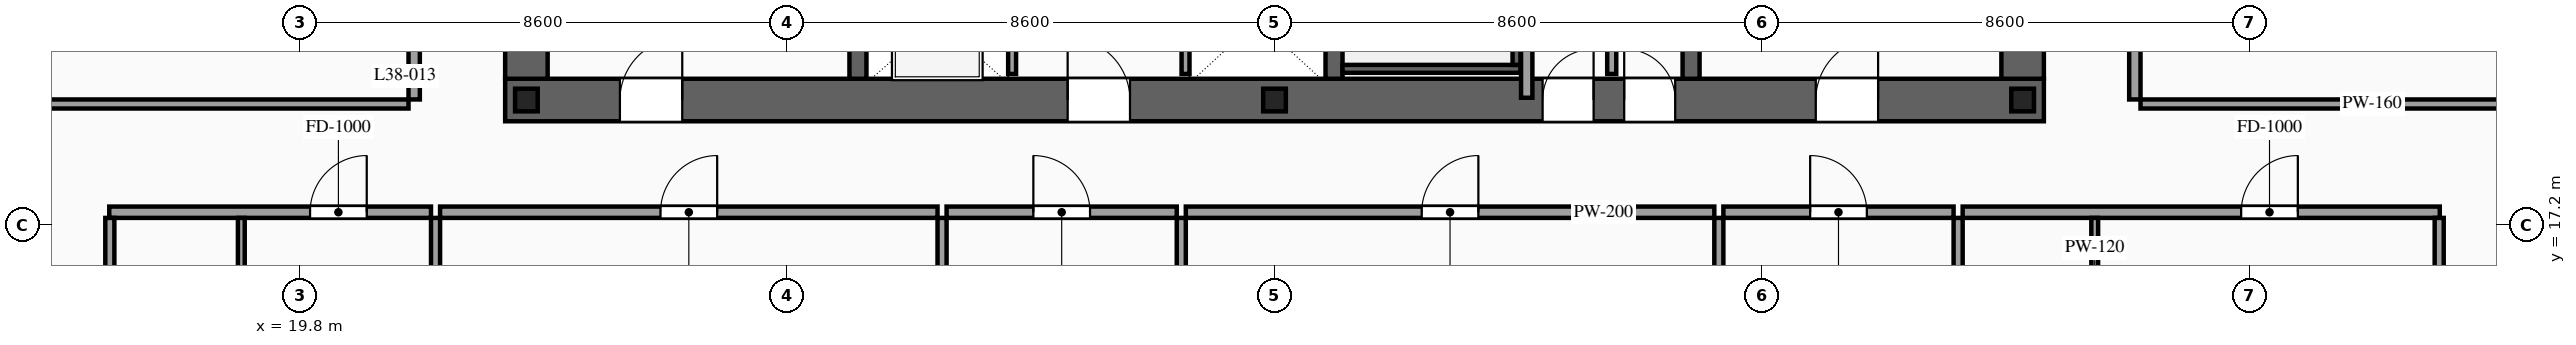
"""IFC4 building model, lengths in metres.
Left out: names, types, materials, properties, quantities, classifications, styles, units other than length and angle.
Written with IfcOpenShell. Run it as: python <this file> out.ifc"""

import sys

from ifc_helpers import new_model, si_unit, direction, frame, frame_2d, origin, origin_2d, place, context, subcontext, project, spatial, rectangle, i_section, extrude, source, transform, mapped, element, fill, save


model = new_model("IFC4")
c1 = context("Model", 3, precision=1e-05, world=origin(), true_north=direction((0.0, 1.0)))
c2 = subcontext(c1, "Body", "Model", "MODEL_VIEW")
j1 = project(units=[si_unit("LENGTHUNIT", "METRE"), si_unit("PLANEANGLEUNIT", "RADIAN")], contexts=[c1])
p1 = place(None, origin())
s1 = spatial("IfcSite", under=j1, at=p1, CompositionType="ELEMENT")
p2 = place(p1, origin())
s2 = spatial("IfcBuilding", under=s1, at=p2, CompositionType="ELEMENT")
p3 = place(p2, frame((0.0, 0.0, 145.2)))
s3 = spatial("IfcBuildingStorey", under=s2, at=p3, CompositionType="ELEMENT", Elevation=145.2)
p4 = place(p3, frame((23.425, 19.4, 0.0), z_axis=(0.0, 0.0, 1.0), x_axis=(1.0, 0.0, 0.0)))
e1 = element("IfcWall", 1, at=p4, inside=s3, PredefinedType="SHEAR", context=c2, shape_type="SweptSolid", body=[
    extrude(rectangle(XDim=27.15, YDim=0.75, at=frame_2d((13.575, 0.0))), origin(), (0.0, 0.0, 1.0), 3.6),
])
p5 = place(p4, frame((2.025, 0.0, 0.0)))
e2 = element("IfcOpeningElement", 2, at=p5, cuts=e1, PredefinedType="OPENING", context=c2, shape_type="SweptSolid", body=[
    extrude(rectangle(XDim=1.1, YDim=2.2, at=frame_2d((0.55, 1.1))), frame((0.0, 0.39, 0.0), z_axis=(0.0, -1.0, 0.0), x_axis=(1.0, 0.0, 0.0)), (0.0, 0.0, 1.0), 0.78),
])
p6 = place(p4, frame((9.925, 0.0, 0.0)))
e3 = element("IfcOpeningElement", 3, at=p6, cuts=e1, PredefinedType="OPENING", context=c2, shape_type="SweptSolid", body=[
    extrude(rectangle(XDim=1.1, YDim=2.2, at=frame_2d((0.55, 1.1))), frame((0.0, 0.39, 0.0), z_axis=(0.0, -1.0, 0.0), x_axis=(1.0, 0.0, 0.0)), (0.0, 0.0, 1.0), 0.78),
])
p7 = place(p4, frame((23.125, 0.0, 0.0)))
e4 = element("IfcOpeningElement", 4, at=p7, cuts=e1, PredefinedType="OPENING", context=c2, shape_type="SweptSolid", body=[
    extrude(rectangle(XDim=1.1, YDim=2.2, at=frame_2d((0.55, 1.1))), frame((0.0, 0.39, 0.0), z_axis=(0.0, -1.0, 0.0), x_axis=(1.0, 0.0, 0.0)), (0.0, 0.0, 1.0), 0.78),
])
p8 = place(p4, frame((19.745, 0.0, 0.0)))
e5 = element("IfcOpeningElement", 5, at=p8, cuts=e1, PredefinedType="OPENING", context=c2, shape_type="SweptSolid", body=[
    extrude(rectangle(XDim=0.9, YDim=2.15, at=frame_2d((0.45, 1.075))), frame((0.0, 0.39, 0.0), z_axis=(0.0, -1.0, 0.0), x_axis=(1.0, 0.0, 0.0)), (0.0, 0.0, 1.0), 0.78),
])
p9 = place(p4, frame((18.305, 0.0, 0.0)))
e6 = element("IfcOpeningElement", 6, at=p9, cuts=e1, PredefinedType="OPENING", context=c2, shape_type="SweptSolid", body=[
    extrude(rectangle(XDim=0.9, YDim=2.15, at=frame_2d((0.45, 1.075))), frame((0.0, 0.39, 0.0), z_axis=(0.0, -1.0, 0.0), x_axis=(1.0, 0.0, 0.0)), (0.0, 0.0, 1.0), 0.78),
])
m1 = source(origin(), c2, "Body", "SweptSolid", [
    extrude(rectangle(XDim=12.05, YDim=0.75, at=frame_2d((6.025, 0.0))), origin(), (0.0, 0.0, 1.0), 3.6),
])
for number, where, z_axis, x_axis in (
    (7, (23.8, 19.775, 0.0), (0.0, 0.0, 1.0), (0.0, 1.0, 0.0)),
    (8, (50.2, 19.775, 0.0), (0.0, 0.0, 1.0), (0.0, 1.0, 0.0)),
):
    element("IfcWall", number, at=place(p3, frame(where, z_axis=z_axis, x_axis=x_axis)), inside=s3, PredefinedType="SHEAR", context=c2, shape_type="MappedRepresentation", body=[
        mapped(m1, transform((0.0, 0.0, 0.0), scale=1.0)),
    ])
m2 = source(origin(), c2, "Body", "SweptSolid", [
    extrude(rectangle(XDim=12.05, YDim=0.3, at=frame_2d((6.025, 0.0))), origin(), (0.0, 0.0, 1.0), 3.6),
])
for number, where, z_axis, x_axis in (
    (9, (29.65, 19.775, 0.0), (0.0, 0.0, 1.0), (0.0, 1.0, 0.0)),
    (10, (38.05, 19.775, 0.0), (0.0, 0.0, 1.0), (0.0, 1.0, 0.0)),
    (11, (44.35, 19.775, 0.0), (0.0, 0.0, 1.0), (0.0, 1.0, 0.0)),
):
    element("IfcWall", number, at=place(p3, frame(where, z_axis=z_axis, x_axis=x_axis)), inside=s3, PredefinedType="SOLIDWALL", context=c2, shape_type="MappedRepresentation", body=[
        mapped(m2, transform((0.0, 0.0, 0.0), scale=1.0)),
    ])
m3 = source(origin(), c2, "Body", "SweptSolid", [
    extrude(i_section(OverallWidth=0.4, OverallDepth=0.4, WebThickness=0.013, FlangeThickness=0.021, at=origin_2d()), origin(), (0.0, 0.0, 1.0), 3.6),
])
for number, where, z_axis, x_axis in (
    (12, (23.8, 19.4, 0.0), (0.0, 0.0, 1.0), (1.0, 0.0, 0.0)),
    (13, (37.0, 19.4, 0.0), (0.0, 0.0, 1.0), (1.0, 0.0, 0.0)),
    (14, (50.2, 19.4, 0.0), (0.0, 0.0, 1.0), (1.0, 0.0, 0.0)),
):
    element("IfcColumn", number, at=place(p3, frame(where, z_axis=z_axis, x_axis=x_axis)), inside=s3, PredefinedType="COLUMN", context=c2, shape_type="MappedRepresentation", body=[
        mapped(m3, transform((0.0, 0.0, 0.0), scale=1.0)),
    ])
p10 = place(p3, frame((32.37, 19.86, 0.0), z_axis=(0.0, 0.0, 1.0), x_axis=(0.0, 1.0, 0.0)))
e15 = element("IfcWall", 15, at=p10, inside=s3, PredefinedType="SOLIDWALL", context=c2, shape_type="SweptSolid", body=[
    extrude(rectangle(XDim=2.04, YDim=0.14, at=frame_2d((1.02, 0.0))), origin(), (0.0, 0.0, 1.0), 3.38),
])
p11 = place(p10, frame((0.47, 0.0, 0.0)))
e16 = element("IfcOpeningElement", 16, at=p11, cuts=e15, PredefinedType="OPENING", context=c2, shape_type="SweptSolid", body=[
    extrude(rectangle(XDim=1.1, YDim=2.2, at=frame_2d((0.55, 1.1))), frame((0.0, 0.085, 0.0), z_axis=(0.0, -1.0, 0.0), x_axis=(1.0, 0.0, 0.0)), (0.0, 0.0, 1.0), 0.17),
])
m4 = source(origin(), c2, "Body", "SweptSolid", [
    extrude(rectangle(XDim=2.04, YDim=0.14, at=frame_2d((1.02, 0.0))), origin(), (0.0, 0.0, 1.0), 3.38),
])
p12 = place(p3, frame((35.43, 19.86, 0.0), z_axis=(0.0, 0.0, 1.0), x_axis=(0.0, 1.0, 0.0)))
e17 = element("IfcWall", 17, at=p12, inside=s3, PredefinedType="SOLIDWALL", context=c2, shape_type="MappedRepresentation", body=[
    mapped(m4, transform((0.0, 0.0, 0.0), scale=1.0)),
])
m5 = source(origin(), c2, "Body", "SweptSolid", [
    extrude(rectangle(XDim=3.14, YDim=0.14, at=frame_2d((1.57, 0.0))), origin(), (0.0, 0.0, 1.0), 3.38),
])
p13 = place(p3, frame((38.2, 19.95, 0.0), z_axis=(0.0, 0.0, 1.0), x_axis=(1.0, 0.0, 0.0)))
e18 = element("IfcWall", 18, at=p13, inside=s3, PredefinedType="SOLIDWALL", context=c2, shape_type="MappedRepresentation", body=[
    mapped(m5, transform((0.0, 0.0, 0.0), scale=1.0)),
])
m6 = source(origin(), c2, "Body", "SweptSolid", [
    extrude(rectangle(XDim=8.94, YDim=0.14, at=frame_2d((4.47, 0.0))), origin(), (0.0, 0.0, 1.0), 3.38),
])
p14 = place(p3, frame((41.27, 20.02, 0.0), z_axis=(0.0, 0.0, 1.0), x_axis=(0.0, 1.0, 0.0)))
e19 = element("IfcWall", 19, at=p14, inside=s3, PredefinedType="SOLIDWALL", context=c2, shape_type="MappedRepresentation", body=[
    mapped(m6, transform((0.0, 0.0, 0.0), scale=1.0)),
])
m7 = source(origin(), c2, "Body", "SweptSolid", [
    extrude(rectangle(XDim=1.34, YDim=0.16, at=frame_2d((0.67, 0.0))), origin(), (0.0, 0.0, 1.0), 3.38),
])
p15 = place(p3, frame((42.95, 19.86, 0.0), z_axis=(0.0, 0.0, 1.0), x_axis=(0.0, 1.0, 0.0)))
e20 = element("IfcWall", 20, at=p15, inside=s3, PredefinedType="PARTITIONING", context=c2, shape_type="MappedRepresentation", body=[
    mapped(m7, transform((0.0, 0.0, 0.0), scale=1.0)),
])
m8 = source(origin(), c2, "Body", "SweptSolid", [
    extrude(rectangle(XDim=12.72, YDim=0.2, at=frame_2d((6.36, 0.0))), origin(), (0.0, 0.0, 1.0), 3.38),
])
p16 = place(p3, frame((41.45, 19.44, 0.0), z_axis=(0.0, 0.0, 1.0), x_axis=(0.0, 1.0, 0.0)))
e21 = element("IfcWall", 21, at=p16, inside=s3, PredefinedType="PARTITIONING", context=c2, shape_type="MappedRepresentation", body=[
    mapped(m8, transform((0.0, 0.0, 0.0), scale=1.0)),
])
p17 = place(p3, frame((16.44, 17.42, 0.0), z_axis=(0.0, 0.0, 1.0), x_axis=(1.0, 0.0, 0.0)))
e22 = element("IfcWall", 22, at=p17, inside=s3, PredefinedType="PARTITIONING", context=c2, shape_type="SweptSolid", body=[
    extrude(rectangle(XDim=5.677, YDim=0.2, at=frame_2d((2.838, 0.0))), origin(), (0.0, 0.0, 1.0), 3.38),
])
p18 = place(p17, frame((3.543, 0.0, 0.0)))
e23 = element("IfcOpeningElement", 23, at=p18, cuts=e22, PredefinedType="OPENING", context=c2, shape_type="SweptSolid", body=[
    extrude(rectangle(XDim=1.0, YDim=2.2, at=frame_2d((0.5, 1.1))), frame((0.0, 0.115, 0.0), z_axis=(0.0, -1.0, 0.0), x_axis=(1.0, 0.0, 0.0)), (0.0, 0.0, 1.0), 0.23),
])
m9 = source(origin(), c2, "Body", "SweptSolid", [
    extrude(rectangle(XDim=14.97, YDim=0.16, at=frame_2d((7.485, 0.0))), origin(), (0.0, 0.0, 1.0), 3.38),
])
p19 = place(p3, frame((22.197, 2.35, 0.0), z_axis=(0.0, 0.0, 1.0), x_axis=(0.0, 1.0, 0.0)))
e24 = element("IfcWall", 24, at=p19, inside=s3, PredefinedType="PARTITIONING", context=c2, shape_type="MappedRepresentation", body=[
    mapped(m9, transform((0.0, 0.0, 0.0), scale=1.0)),
])
m10 = source(origin(), c2, "Body", "SweptSolid", [
    extrude(rectangle(XDim=2.42, YDim=0.12, at=frame_2d((1.21, 0.0))), origin(), (0.0, 0.0, 1.0), 3.38),
])
p20 = place(p3, frame((18.77, 14.9, 0.0), z_axis=(0.0, 0.0, 1.0), x_axis=(0.0, 1.0, 0.0)))
e25 = element("IfcWall", 25, at=p20, inside=s3, PredefinedType="PARTITIONING", context=c2, shape_type="MappedRepresentation", body=[
    mapped(m10, transform((0.0, 0.0, 0.0), scale=1.0)),
])
p21 = place(p3, frame((22.277, 17.42, 0.0), z_axis=(0.0, 0.0, 1.0), x_axis=(1.0, 0.0, 0.0)))
e26 = element("IfcWall", 26, at=p21, inside=s3, PredefinedType="PARTITIONING", context=c2, shape_type="SweptSolid", body=[
    extrude(rectangle(XDim=8.777, YDim=0.2, at=frame_2d((4.388, 0.0))), origin(), (0.0, 0.0, 1.0), 3.38),
])
p22 = place(p21, frame((3.889, 0.0, 0.0)))
e27 = element("IfcOpeningElement", 27, at=p22, cuts=e26, PredefinedType="OPENING", context=c2, shape_type="SweptSolid", body=[
    extrude(rectangle(XDim=1.0, YDim=2.2, at=frame_2d((0.5, 1.1))), frame((0.0, 0.115, 0.0), z_axis=(0.0, -1.0, 0.0), x_axis=(1.0, 0.0, 0.0)), (0.0, 0.0, 1.0), 0.23),
])
p23 = place(p3, frame((31.134, 2.35, 0.0), z_axis=(0.0, 0.0, 1.0), x_axis=(0.0, 1.0, 0.0)))
e28 = element("IfcWall", 28, at=p23, inside=s3, PredefinedType="PARTITIONING", context=c2, shape_type="MappedRepresentation", body=[
    mapped(m9, transform((0.0, 0.0, 0.0), scale=1.0)),
])
p24 = place(p3, frame((31.214, 17.42, 0.0), z_axis=(0.0, 0.0, 1.0), x_axis=(1.0, 0.0, 0.0)))
e29 = element("IfcWall", 29, at=p24, inside=s3, PredefinedType="PARTITIONING", context=c2, shape_type="SweptSolid", body=[
    extrude(rectangle(XDim=4.061, YDim=0.2, at=frame_2d((2.03, 0.0))), origin(), (0.0, 0.0, 1.0), 3.38),
])
p25 = place(p24, frame((1.531, 0.0, 0.0)))
e30 = element("IfcOpeningElement", 30, at=p25, cuts=e29, PredefinedType="OPENING", context=c2, shape_type="SweptSolid", body=[
    extrude(rectangle(XDim=1.0, YDim=2.2, at=frame_2d((0.5, 1.1))), frame((0.0, 0.115, 0.0), z_axis=(0.0, -1.0, 0.0), x_axis=(1.0, 0.0, 0.0)), (0.0, 0.0, 1.0), 0.23),
])
p26 = place(p3, frame((35.355, 2.35, 0.0), z_axis=(0.0, 0.0, 1.0), x_axis=(0.0, 1.0, 0.0)))
e31 = element("IfcWall", 31, at=p26, inside=s3, PredefinedType="PARTITIONING", context=c2, shape_type="MappedRepresentation", body=[
    mapped(m9, transform((0.0, 0.0, 0.0), scale=1.0)),
])
p27 = place(p3, frame((35.435, 17.42, 0.0), z_axis=(0.0, 0.0, 1.0), x_axis=(1.0, 0.0, 0.0)))
e32 = element("IfcWall", 32, at=p27, inside=s3, PredefinedType="PARTITIONING", context=c2, shape_type="SweptSolid", body=[
    extrude(rectangle(XDim=9.325, YDim=0.2, at=frame_2d((4.663, 0.0))), origin(), (0.0, 0.0, 1.0), 3.38),
])
p28 = place(p27, frame((4.162, 0.0, 0.0)))
e33 = element("IfcOpeningElement", 33, at=p28, cuts=e32, PredefinedType="OPENING", context=c2, shape_type="SweptSolid", body=[
    extrude(rectangle(XDim=1.0, YDim=2.2, at=frame_2d((0.5, 1.1))), frame((0.0, 0.115, 0.0), z_axis=(0.0, -1.0, 0.0), x_axis=(1.0, 0.0, 0.0)), (0.0, 0.0, 1.0), 0.23),
])
p29 = place(p3, frame((44.84, 2.35, 0.0), z_axis=(0.0, 0.0, 1.0), x_axis=(0.0, 1.0, 0.0)))
e34 = element("IfcWall", 34, at=p29, inside=s3, PredefinedType="PARTITIONING", context=c2, shape_type="MappedRepresentation", body=[
    mapped(m9, transform((0.0, 0.0, 0.0), scale=1.0)),
])
p30 = place(p3, frame((44.92, 17.42, 0.0), z_axis=(0.0, 0.0, 1.0), x_axis=(1.0, 0.0, 0.0)))
e35 = element("IfcWall", 35, at=p30, inside=s3, PredefinedType="PARTITIONING", context=c2, shape_type="SweptSolid", body=[
    extrude(rectangle(XDim=4.062, YDim=0.2, at=frame_2d((2.031, 0.0))), origin(), (0.0, 0.0, 1.0), 3.38),
])
p31 = place(p30, frame((1.531, 0.0, 0.0)))
e36 = element("IfcOpeningElement", 36, at=p31, cuts=e35, PredefinedType="OPENING", context=c2, shape_type="SweptSolid", body=[
    extrude(rectangle(XDim=1.0, YDim=2.2, at=frame_2d((0.5, 1.1))), frame((0.0, 0.115, 0.0), z_axis=(0.0, -1.0, 0.0), x_axis=(1.0, 0.0, 0.0)), (0.0, 0.0, 1.0), 0.23),
])
p32 = place(p3, frame((49.062, 2.35, 0.0), z_axis=(0.0, 0.0, 1.0), x_axis=(0.0, 1.0, 0.0)))
e37 = element("IfcWall", 37, at=p32, inside=s3, PredefinedType="PARTITIONING", context=c2, shape_type="MappedRepresentation", body=[
    mapped(m9, transform((0.0, 0.0, 0.0), scale=1.0)),
])
p33 = place(p3, frame((49.142, 17.42, 0.0), z_axis=(0.0, 0.0, 1.0), x_axis=(1.0, 0.0, 0.0)))
e38 = element("IfcWall", 38, at=p33, inside=s3, PredefinedType="PARTITIONING", context=c2, shape_type="SweptSolid", body=[
    extrude(rectangle(XDim=8.418, YDim=0.2, at=frame_2d((4.209, 0.0))), origin(), (0.0, 0.0, 1.0), 3.38),
])
p34 = place(p33, frame((4.914, 0.0, 0.0)))
e39 = element("IfcOpeningElement", 39, at=p34, cuts=e38, PredefinedType="OPENING", context=c2, shape_type="SweptSolid", body=[
    extrude(rectangle(XDim=1.0, YDim=2.2, at=frame_2d((0.5, 1.1))), frame((0.0, 0.115, 0.0), z_axis=(0.0, -1.0, 0.0), x_axis=(1.0, 0.0, 0.0)), (0.0, 0.0, 1.0), 0.23),
])
m11 = source(origin(), c2, "Body", "SweptSolid", [
    extrude(rectangle(XDim=14.82, YDim=0.16, at=frame_2d((7.41, 0.0))), origin(), (0.0, 0.0, 1.0), 3.38),
])
for number, where, z_axis, x_axis in (
    (40, (16.45, 2.5, 0.0), (0.0, 0.0, 1.0), (0.0, 1.0, 0.0)),
    (41, (57.55, 2.5, 0.0), (0.0, 0.0, 1.0), (0.0, 1.0, 0.0)),
):
    element("IfcWall", number, at=place(p3, frame(where, z_axis=z_axis, x_axis=x_axis)), inside=s3, PredefinedType="PARTITIONING", context=c2, shape_type="MappedRepresentation", body=[
        mapped(m11, transform((0.0, 0.0, 0.0), scale=1.0)),
    ])
p35 = place(p3, frame((51.472, 14.9, 0.0), z_axis=(0.0, 0.0, 1.0), x_axis=(0.0, 1.0, 0.0)))
e42 = element("IfcWall", 42, at=p35, inside=s3, PredefinedType="PARTITIONING", context=c2, shape_type="MappedRepresentation", body=[
    mapped(m10, transform((0.0, 0.0, 0.0), scale=1.0)),
])
p36 = place(p3, frame((21.82, 19.41, 0.0), z_axis=(0.0, 0.0, 1.0), x_axis=(0.0, 1.0, 0.0)))
e43 = element("IfcWall", 43, at=p36, inside=s3, PredefinedType="PARTITIONING", context=c2, shape_type="SweptSolid", body=[
    extrude(rectangle(XDim=6.31, YDim=0.2, at=frame_2d((3.155, 0.0))), origin(), (0.0, 0.0, 1.0), 3.38),
])
p37 = place(p36, frame((2.655, 0.0, 0.0)))
e44 = element("IfcOpeningElement", 44, at=p37, cuts=e43, PredefinedType="OPENING", context=c2, shape_type="SweptSolid", body=[
    extrude(rectangle(XDim=1.0, YDim=2.2, at=frame_2d((0.5, 1.1))), frame((0.0, 0.115, 0.0), z_axis=(0.0, -1.0, 0.0), x_axis=(1.0, 0.0, 0.0)), (0.0, 0.0, 1.0), 0.23),
])
m12 = source(origin(), c2, "Body", "SweptSolid", [
    extrude(rectangle(XDim=8.17, YDim=0.16, at=frame_2d((4.085, 0.0))), origin(), (0.0, 0.0, 1.0), 2.875),
])
p38 = place(p3, frame((13.55, 19.33, 0.0), z_axis=(0.0, 0.0, 1.0), x_axis=(1.0, 0.0, 0.0)))
e45 = element("IfcWall", 45, at=p38, inside=s3, PredefinedType="PARTITIONING", context=c2, shape_type="MappedRepresentation", body=[
    mapped(m12, transform((0.0, 0.0, 0.0), scale=1.0)),
])
p39 = place(p3, frame((52.18, 19.41, 0.0), z_axis=(0.0, 0.0, 1.0), x_axis=(0.0, 1.0, 0.0)))
e46 = element("IfcWall", 46, at=p39, inside=s3, PredefinedType="PARTITIONING", context=c2, shape_type="SweptSolid", body=[
    extrude(rectangle(XDim=6.31, YDim=0.2, at=frame_2d((3.155, 0.0))), origin(), (0.0, 0.0, 1.0), 3.38),
])
p40 = place(p39, frame((2.655, 0.0, 0.0)))
e47 = element("IfcOpeningElement", 47, at=p40, cuts=e46, PredefinedType="OPENING", context=c2, shape_type="SweptSolid", body=[
    extrude(rectangle(XDim=1.0, YDim=2.2, at=frame_2d((0.5, 1.1))), frame((0.0, 0.115, 0.0), z_axis=(0.0, -1.0, 0.0), x_axis=(1.0, 0.0, 0.0)), (0.0, 0.0, 1.0), 0.23),
])
p41 = place(p3, frame((52.28, 19.33, 0.0), z_axis=(0.0, 0.0, 1.0), x_axis=(1.0, 0.0, 0.0)))
e48 = element("IfcWall", 48, at=p41, inside=s3, PredefinedType="PARTITIONING", context=c2, shape_type="MappedRepresentation", body=[
    mapped(m12, transform((0.0, 0.0, 0.0), scale=1.0)),
])
m13 = source(origin(), c2, "Body", "SweptSolid", [
    extrude(rectangle(XDim=1.1, YDim=2.2, at=frame_2d((0.55, 1.1))), frame((0.0, 0.025, 0.0), z_axis=(0.0, -1.0, 0.0), x_axis=(1.0, 0.0, 0.0)), (0.0, 0.0, 1.0), 0.05),
])
p42 = place(p5, origin())
e49 = element("IfcDoor", 49, at=p42, inside=s3, OperationType="SINGLE_SWING_RIGHT", PredefinedType="DOOR", context=c2, shape_type="MappedRepresentation", body=[
    mapped(m13, transform((0.0, 0.0, 0.0), scale=1.0)),
])
fill(e2, e49)
p43 = place(p6, origin())
e50 = element("IfcDoor", 50, at=p43, inside=s3, OperationType="SINGLE_SWING_LEFT", PredefinedType="DOOR", context=c2, shape_type="MappedRepresentation", body=[
    mapped(m13, transform((0.0, 0.0, 0.0), scale=1.0)),
])
fill(e3, e50)
p44 = place(p7, origin())
e51 = element("IfcDoor", 51, at=p44, inside=s3, OperationType="SINGLE_SWING_RIGHT", PredefinedType="DOOR", context=c2, shape_type="MappedRepresentation", body=[
    mapped(m13, transform((0.0, 0.0, 0.0), scale=1.0)),
])
fill(e4, e51)
m14 = source(origin(), c2, "Body", "SweptSolid", [
    extrude(rectangle(XDim=0.9, YDim=2.15, at=frame_2d((0.45, 1.075))), frame((0.0, 0.025, 0.0), z_axis=(0.0, -1.0, 0.0), x_axis=(1.0, 0.0, 0.0)), (0.0, 0.0, 1.0), 0.05),
])
p45 = place(p8, origin())
e52 = element("IfcDoor", 52, at=p45, inside=s3, OperationType="SINGLE_SWING_LEFT", PredefinedType="DOOR", context=c2, shape_type="MappedRepresentation", body=[
    mapped(m14, transform((0.0, 0.0, 0.0), scale=1.0)),
])
fill(e5, e52)
p46 = place(p9, origin())
e53 = element("IfcDoor", 53, at=p46, inside=s3, OperationType="SINGLE_SWING_RIGHT", PredefinedType="DOOR", context=c2, shape_type="MappedRepresentation", body=[
    mapped(m14, transform((0.0, 0.0, 0.0), scale=1.0)),
])
fill(e6, e53)
m15 = source(origin(), c2, "Body", "SweptSolid", [
    extrude(rectangle(XDim=1.0, YDim=2.2, at=frame_2d((0.5, 1.1))), frame((0.0, 0.025, 0.0), z_axis=(0.0, -1.0, 0.0), x_axis=(1.0, 0.0, 0.0)), (0.0, 0.0, 1.0), 0.05),
])
p47 = place(p18, origin())
e54 = element("IfcDoor", 54, at=p47, inside=s3, OperationType="SINGLE_SWING_RIGHT", PredefinedType="DOOR", context=c2, shape_type="MappedRepresentation", body=[
    mapped(m15, transform((0.0, 0.0, 0.0), scale=1.0)),
])
fill(e23, e54)
p48 = place(p22, origin())
e55 = element("IfcDoor", 55, at=p48, inside=s3, OperationType="SINGLE_SWING_RIGHT", PredefinedType="DOOR", context=c2, shape_type="MappedRepresentation", body=[
    mapped(m15, transform((0.0, 0.0, 0.0), scale=1.0)),
])
fill(e27, e55)
p49 = place(p25, origin())
e56 = element("IfcDoor", 56, at=p49, inside=s3, OperationType="SINGLE_SWING_LEFT", PredefinedType="DOOR", context=c2, shape_type="MappedRepresentation", body=[
    mapped(m15, transform((0.0, 0.0, 0.0), scale=1.0)),
])
fill(e30, e56)
p50 = place(p28, origin())
e57 = element("IfcDoor", 57, at=p50, inside=s3, OperationType="SINGLE_SWING_RIGHT", PredefinedType="DOOR", context=c2, shape_type="MappedRepresentation", body=[
    mapped(m15, transform((0.0, 0.0, 0.0), scale=1.0)),
])
fill(e33, e57)
p51 = place(p31, origin())
e58 = element("IfcDoor", 58, at=p51, inside=s3, OperationType="SINGLE_SWING_LEFT", PredefinedType="DOOR", context=c2, shape_type="MappedRepresentation", body=[
    mapped(m15, transform((0.0, 0.0, 0.0), scale=1.0)),
])
fill(e36, e58)
p52 = place(p34, origin())
e59 = element("IfcDoor", 59, at=p52, inside=s3, OperationType="SINGLE_SWING_RIGHT", PredefinedType="DOOR", context=c2, shape_type="MappedRepresentation", body=[
    mapped(m15, transform((0.0, 0.0, 0.0), scale=1.0)),
])
fill(e39, e59)
save(model, sys.argv[1])
